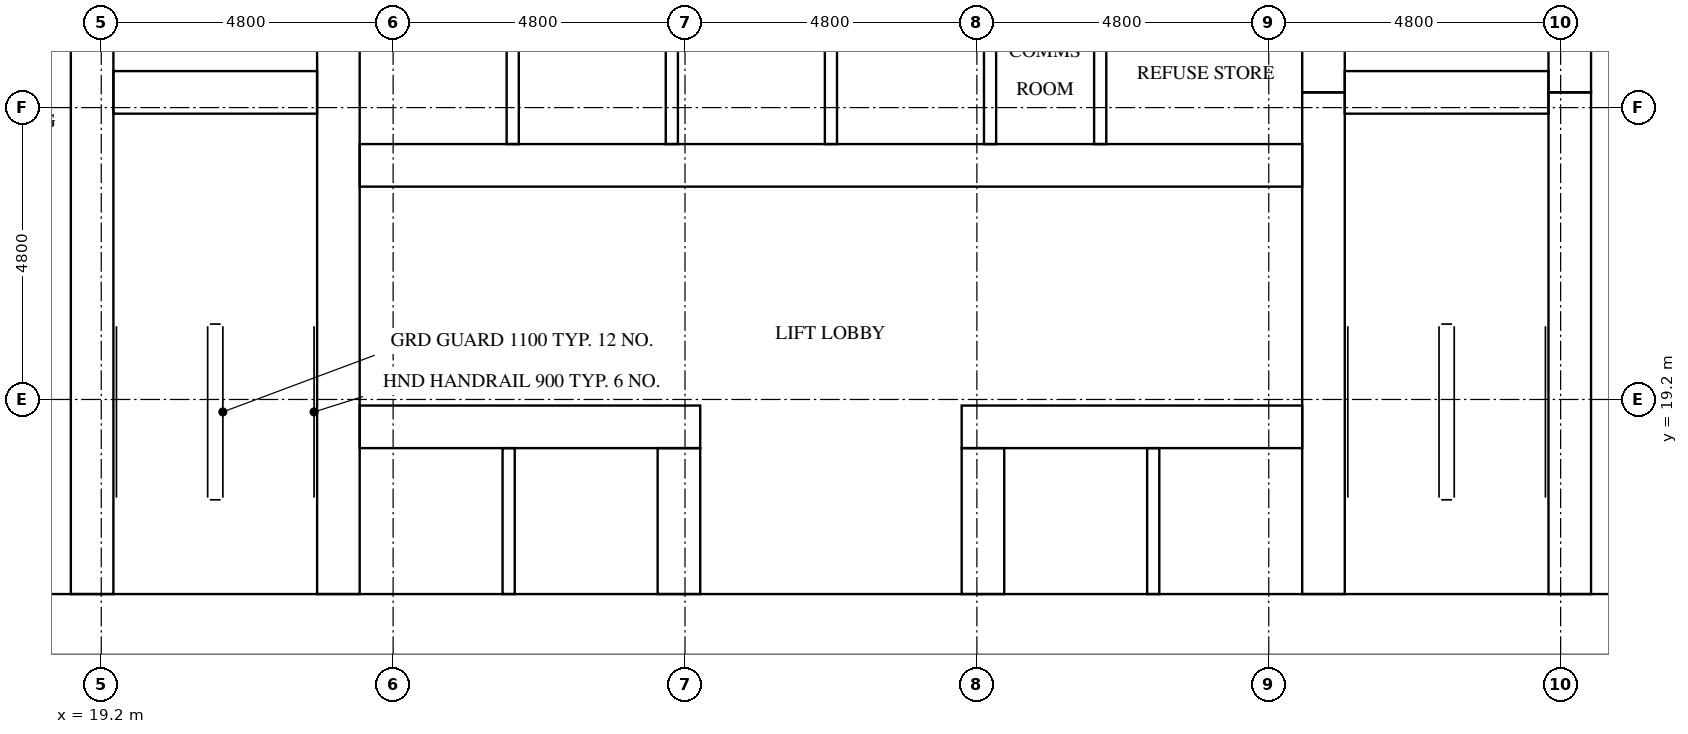
"""IFC4 building model, lengths in metres.
Left out: names, types, materials, properties, quantities, classifications, styles, units other than length and angle.
Written with IfcOpenShell. Run it as: python <this file> out.ifc"""

import sys

from ifc_helpers import new_model, si_unit, direction, frame, frame_2d, origin, place, context, subcontext, project, spatial, rectangle, extrude, element, fill, save


model = new_model("IFC4")
c1 = context("Model", 3, precision=1e-05, world=origin(), true_north=direction((0.0, 1.0)))
c2 = subcontext(c1, "Body", "Model", "MODEL_VIEW")
j1 = project(units=[si_unit("LENGTHUNIT", "METRE"), si_unit("PLANEANGLEUNIT", "RADIAN")], contexts=[c1])
p1 = place(None, origin())
s1 = spatial("IfcSite", under=j1, at=p1, CompositionType="ELEMENT")
p2 = place(p1, origin())
s2 = spatial("IfcBuilding", under=s1, at=p2, CompositionType="ELEMENT")
p3 = place(p2, frame((0.0, 0.0, 43.4)))
s3 = spatial("IfcBuildingStorey", under=s2, at=p3, CompositionType="ELEMENT", Elevation=43.4)
p4 = place(p3, frame((15.0, 15.5, 0.0), z_axis=(0.0, 0.0, 1.0), x_axis=(1.0, 0.0, 0.0)))
e1 = element("IfcWall", 1, at=p4, inside=s3, PredefinedType="SHEAR", context=c2, shape_type="SweptSolid", body=[
    extrude(rectangle(XDim=32.4, YDim=1.0, at=frame_2d((16.2, 0.0))), origin(), (0.0, 0.0, 1.0), 3.2),
])
p5 = place(p4, frame((15.3, 0.0, 0.0)))
e2 = element("IfcOpeningElement", 2, at=p5, cuts=e1, PredefinedType="OPENING", context=c2, shape_type="SweptSolid", body=[
    extrude(rectangle(XDim=1.8, YDim=2.1, at=frame_2d((0.9, 1.05))), frame((0.0, 0.51, 0.0), z_axis=(0.0, -1.0, 0.0), x_axis=(1.0, 0.0, 0.0)), (0.0, 0.0, 1.0), 1.02),
])
p6 = place(p3, frame((19.05, 16.0, 0.0), z_axis=(0.0, 0.0, 1.0), x_axis=(0.0, 1.0, 0.0)))
e3 = element("IfcWall", 3, at=p6, inside=s3, PredefinedType="SHEAR", context=c2, shape_type="SweptSolid", body=[
    extrude(rectangle(XDim=14.9, YDim=0.7, at=frame_2d((7.45, 0.0))), origin(), (0.0, 0.0, 1.0), 3.2),
])
p7 = place(p6, frame((9.45, 0.0, 0.0)))
e4 = element("IfcOpeningElement", 4, at=p7, cuts=e3, PredefinedType="OPENING", context=c2, shape_type="SweptSolid", body=[
    extrude(rectangle(XDim=1.1, YDim=2.1, at=frame_2d((0.55, 1.05))), frame((0.0, 0.36, 0.0), z_axis=(0.0, -1.0, 0.0), x_axis=(1.0, 0.0, 0.0)), (0.0, 0.0, 1.0), 0.72),
])
p8 = place(p6, frame((12.95, 0.0, 0.0)))
e5 = element("IfcOpeningElement", 5, at=p8, cuts=e3, PredefinedType="OPENING", context=c2, shape_type="SweptSolid", body=[
    extrude(rectangle(XDim=1.1, YDim=2.1, at=frame_2d((0.55, 1.05))), frame((0.0, 0.36, 0.0), z_axis=(0.0, -1.0, 0.0), x_axis=(1.0, 0.0, 0.0)), (0.0, 0.0, 1.0), 0.72),
])
p9 = place(p6, frame((0.2, 0.0, 0.0)))
e6 = element("IfcOpeningElement", 6, at=p9, cuts=e3, PredefinedType="OPENING", context=c2, shape_type="SweptSolid", body=[
    extrude(rectangle(XDim=1.2, YDim=2.1, at=frame_2d((0.6, 1.05))), frame((0.0, 0.36, 0.0), z_axis=(0.0, -1.0, 0.0), x_axis=(1.0, 0.0, 0.0)), (0.0, 0.0, 1.0), 0.72),
])
p10 = place(p3, frame((23.1, 16.0, 0.0), z_axis=(0.0, 0.0, 1.0), x_axis=(0.0, 1.0, 0.0)))
e7 = element("IfcWall", 7, at=p10, inside=s3, PredefinedType="SHEAR", context=c2, shape_type="SweptSolid", body=[
    extrude(rectangle(XDim=20.8, YDim=0.7, at=frame_2d((10.4, 0.0))), origin(), (0.0, 0.0, 1.0), 3.2),
])
p11 = place(p3, frame((39.3, 16.0, 0.0), z_axis=(0.0, 0.0, 1.0), x_axis=(0.0, 1.0, 0.0)))
e8 = element("IfcWall", 8, at=p11, inside=s3, PredefinedType="SHEAR", context=c2, shape_type="SweptSolid", body=[
    extrude(rectangle(XDim=8.25, YDim=0.7, at=frame_2d((4.125, 0.0))), origin(), (0.0, 0.0, 1.0), 3.2),
])
p12 = place(p3, frame((39.3, 24.25, 0.0), z_axis=(0.0, 0.0, 1.0), x_axis=(0.0, 1.0, 0.0)))
e9 = element("IfcWall", 9, at=p12, inside=s3, PredefinedType="SHEAR", context=c2, shape_type="SweptSolid", body=[
    extrude(rectangle(XDim=3.5, YDim=0.7, at=frame_2d((1.75, 0.0))), origin(), (0.0, 0.0, 1.0), 3.2),
])
p13 = place(p3, frame((43.35, 16.0, 0.0), z_axis=(0.0, 0.0, 1.0), x_axis=(0.0, 1.0, 0.0)))
e10 = element("IfcWall", 10, at=p13, inside=s3, PredefinedType="SHEAR", context=c2, shape_type="SweptSolid", body=[
    extrude(rectangle(XDim=8.25, YDim=0.7, at=frame_2d((4.125, 0.0))), origin(), (0.0, 0.0, 1.0), 3.2),
])
p14 = place(p13, frame((0.2, 0.0, 0.0)))
e11 = element("IfcOpeningElement", 11, at=p14, cuts=e10, PredefinedType="OPENING", context=c2, shape_type="SweptSolid", body=[
    extrude(rectangle(XDim=1.2, YDim=2.1, at=frame_2d((0.6, 1.05))), frame((0.0, 0.36, 0.0), z_axis=(0.0, -1.0, 0.0), x_axis=(1.0, 0.0, 0.0)), (0.0, 0.0, 1.0), 0.72),
])
p15 = place(p3, frame((43.35, 24.25, 0.0), z_axis=(0.0, 0.0, 1.0), x_axis=(0.0, 1.0, 0.0)))
e12 = element("IfcWall", 12, at=p15, inside=s3, PredefinedType="SHEAR", context=c2, shape_type="SweptSolid", body=[
    extrude(rectangle(XDim=3.5, YDim=0.7, at=frame_2d((1.75, 0.0))), origin(), (0.0, 0.0, 1.0), 3.2),
])
p16 = place(p15, frame((1.2, 0.0, 0.0)))
e13 = element("IfcOpeningElement", 13, at=p16, cuts=e12, PredefinedType="OPENING", context=c2, shape_type="SweptSolid", body=[
    extrude(rectangle(XDim=1.1, YDim=2.1, at=frame_2d((0.55, 1.05))), frame((0.0, 0.36, 0.0), z_axis=(0.0, -1.0, 0.0), x_axis=(1.0, 0.0, 0.0)), (0.0, 0.0, 1.0), 0.72),
])
for number, where, z_axis, x_axis in (
    (14, (19.4, 24.25, 0.0), (0.0, 0.0, 1.0), (1.0, 0.0, 0.0)),
    (15, (39.65, 24.25, 0.0), (0.0, 0.0, 1.0), (1.0, 0.0, 0.0)),
):
    element("IfcWall", number, at=place(p3, frame(where, z_axis=z_axis, x_axis=x_axis)), inside=s3, PredefinedType="SHEAR", context=c2, shape_type="SweptSolid", body=[
        extrude(rectangle(XDim=3.35, YDim=0.7, at=frame_2d((1.675, 0.0))), origin(), (0.0, 0.0, 1.0), 3.2),
    ])
p17 = place(p3, frame((23.45, 18.75, 0.0), z_axis=(0.0, 0.0, 1.0), x_axis=(1.0, 0.0, 0.0)))
e16 = element("IfcWall", 16, at=p17, inside=s3, PredefinedType="SHEAR", context=c2, shape_type="SweptSolid", body=[
    extrude(rectangle(XDim=5.6, YDim=0.7, at=frame_2d((2.8, 0.0))), origin(), (0.0, 0.0, 1.0), 3.2),
])
p18 = place(p17, frame((0.625, 0.0, 0.0)))
e17 = element("IfcOpeningElement", 17, at=p18, cuts=e16, PredefinedType="OPENING", context=c2, shape_type="SweptSolid", body=[
    extrude(rectangle(XDim=1.1, YDim=2.1, at=frame_2d((0.55, 1.05))), frame((0.0, 0.36, 0.0), z_axis=(0.0, -1.0, 0.0), x_axis=(1.0, 0.0, 0.0)), (0.0, 0.0, 1.0), 0.72),
])
p19 = place(p17, frame((3.175, 0.0, 0.0)))
e18 = element("IfcOpeningElement", 18, at=p19, cuts=e16, PredefinedType="OPENING", context=c2, shape_type="SweptSolid", body=[
    extrude(rectangle(XDim=1.1, YDim=2.1, at=frame_2d((0.55, 1.05))), frame((0.0, 0.36, 0.0), z_axis=(0.0, -1.0, 0.0), x_axis=(1.0, 0.0, 0.0)), (0.0, 0.0, 1.0), 0.72),
])
p20 = place(p3, frame((33.35, 18.75, 0.0), z_axis=(0.0, 0.0, 1.0), x_axis=(1.0, 0.0, 0.0)))
e19 = element("IfcWall", 19, at=p20, inside=s3, PredefinedType="SHEAR", context=c2, shape_type="SweptSolid", body=[
    extrude(rectangle(XDim=5.6, YDim=0.7, at=frame_2d((2.8, 0.0))), origin(), (0.0, 0.0, 1.0), 3.2),
])
p21 = place(p20, frame((1.325, 0.0, 0.0)))
e20 = element("IfcOpeningElement", 20, at=p21, cuts=e19, PredefinedType="OPENING", context=c2, shape_type="SweptSolid", body=[
    extrude(rectangle(XDim=1.1, YDim=2.1, at=frame_2d((0.55, 1.05))), frame((0.0, 0.36, 0.0), z_axis=(0.0, -1.0, 0.0), x_axis=(1.0, 0.0, 0.0)), (0.0, 0.0, 1.0), 0.72),
])
p22 = place(p20, frame((3.875, 0.0, 0.0)))
e21 = element("IfcOpeningElement", 21, at=p22, cuts=e19, PredefinedType="OPENING", context=c2, shape_type="SweptSolid", body=[
    extrude(rectangle(XDim=1.1, YDim=2.1, at=frame_2d((0.55, 1.05))), frame((0.0, 0.36, 0.0), z_axis=(0.0, -1.0, 0.0), x_axis=(1.0, 0.0, 0.0)), (0.0, 0.0, 1.0), 0.72),
])
p23 = place(p3, frame((23.45, 23.05, 0.0), z_axis=(0.0, 0.0, 1.0), x_axis=(1.0, 0.0, 0.0)))
e22 = element("IfcWall", 22, at=p23, inside=s3, PredefinedType="SHEAR", context=c2, shape_type="SweptSolid", body=[
    extrude(rectangle(XDim=15.5, YDim=0.7, at=frame_2d((7.75, 0.0))), origin(), (0.0, 0.0, 1.0), 3.2),
])
p24 = place(p23, frame((0.658, 0.0, 0.0)))
e23 = element("IfcOpeningElement", 23, at=p24, cuts=e22, PredefinedType="OPENING", context=c2, shape_type="SweptSolid", body=[
    extrude(rectangle(XDim=1.1, YDim=2.1, at=frame_2d((0.55, 1.05))), frame((0.0, 0.36, 0.0), z_axis=(0.0, -1.0, 0.0), x_axis=(1.0, 0.0, 0.0)), (0.0, 0.0, 1.0), 0.72),
])
p25 = place(p23, frame((3.275, 0.0, 0.0)))
e24 = element("IfcOpeningElement", 24, at=p25, cuts=e22, PredefinedType="OPENING", context=c2, shape_type="SweptSolid", body=[
    extrude(rectangle(XDim=1.1, YDim=2.1, at=frame_2d((0.55, 1.05))), frame((0.0, 0.36, 0.0), z_axis=(0.0, -1.0, 0.0), x_axis=(1.0, 0.0, 0.0)), (0.0, 0.0, 1.0), 0.72),
])
p26 = place(p23, frame((10.772, 0.0, 0.0)))
e25 = element("IfcOpeningElement", 25, at=p26, cuts=e22, PredefinedType="OPENING", context=c2, shape_type="SweptSolid", body=[
    extrude(rectangle(XDim=1.0, YDim=2.1, at=frame_2d((0.5, 1.05))), frame((0.0, 0.36, 0.0), z_axis=(0.0, -1.0, 0.0), x_axis=(1.0, 0.0, 0.0)), (0.0, 0.0, 1.0), 0.72),
])
p27 = place(p23, frame((13.389, 0.0, 0.0)))
e26 = element("IfcOpeningElement", 26, at=p27, cuts=e22, PredefinedType="OPENING", context=c2, shape_type="SweptSolid", body=[
    extrude(rectangle(XDim=1.0, YDim=2.1, at=frame_2d((0.5, 1.05))), frame((0.0, 0.36, 0.0), z_axis=(0.0, -1.0, 0.0), x_axis=(1.0, 0.0, 0.0)), (0.0, 0.0, 1.0), 0.72),
])
for number, where, z_axis, x_axis in (
    (27, (28.7, 16.0, 0.0), (0.0, 0.0, 1.0), (0.0, 1.0, 0.0)),
    (28, (33.7, 16.0, 0.0), (0.0, 0.0, 1.0), (0.0, 1.0, 0.0)),
):
    element("IfcWall", number, at=place(p3, frame(where, z_axis=z_axis, x_axis=x_axis)), inside=s3, PredefinedType="SHEAR", context=c2, shape_type="SweptSolid", body=[
        extrude(rectangle(XDim=2.4, YDim=0.7, at=frame_2d((1.2, 0.0))), origin(), (0.0, 0.0, 1.0), 3.2),
    ])
for number, where, z_axis, x_axis in (
    (29, (25.967, 23.4, 0.0), (0.0, 0.0, 1.0), (0.0, 1.0, 0.0)),
    (30, (28.583, 23.4, 0.0), (0.0, 0.0, 1.0), (0.0, 1.0, 0.0)),
    (31, (31.2, 23.4, 0.0), (0.0, 0.0, 1.0), (0.0, 1.0, 0.0)),
    (32, (33.817, 23.4, 0.0), (0.0, 0.0, 1.0), (0.0, 1.0, 0.0)),
):
    element("IfcWall", number, at=place(p3, frame(where, z_axis=z_axis, x_axis=x_axis)), inside=s3, PredefinedType="SOLIDWALL", context=c2, shape_type="SweptSolid", body=[
        extrude(rectangle(XDim=2.4, YDim=0.2, at=frame_2d((1.2, 0.0))), origin(), (0.0, 0.0, 1.0), 3.2),
    ])
for number, where, z_axis, x_axis in (
    (33, (25.9, 16.0, 0.0), (0.0, 0.0, 1.0), (0.0, 1.0, 0.0)),
    (34, (36.5, 16.0, 0.0), (0.0, 0.0, 1.0), (0.0, 1.0, 0.0)),
):
    element("IfcWall", number, at=place(p3, frame(where, z_axis=z_axis, x_axis=x_axis)), inside=s3, PredefinedType="SOLIDWALL", context=c2, shape_type="SweptSolid", body=[
        extrude(rectangle(XDim=2.4, YDim=0.2, at=frame_2d((1.2, 0.0))), origin(), (0.0, 0.0, 1.0), 3.2),
    ])
p28 = place(p3, frame((35.628, 23.4, 0.0), z_axis=(0.0, 0.0, 1.0), x_axis=(0.0, 1.0, 0.0)))
e35 = element("IfcWall", 35, at=p28, inside=s3, PredefinedType="PARTITIONING", context=c2, shape_type="SweptSolid", body=[
    extrude(rectangle(XDim=2.4, YDim=0.2, at=frame_2d((1.2, 0.0))), origin(), (0.0, 0.0, 1.0), 3.2),
])
p29 = place(p18, origin())
e36 = element("IfcDoor", 36, at=p29, inside=s3, OperationType="DOUBLE_DOOR_SLIDING", PredefinedType="DOOR", context=c2, shape_type="SweptSolid", body=[
    extrude(rectangle(XDim=1.1, YDim=2.1, at=frame_2d((0.55, 1.05))), frame((0.0, 0.025, 0.0), z_axis=(0.0, -1.0, 0.0), x_axis=(1.0, 0.0, 0.0)), (0.0, 0.0, 1.0), 0.05),
])
fill(e17, e36)
p30 = place(p19, origin())
e37 = element("IfcDoor", 37, at=p30, inside=s3, OperationType="DOUBLE_DOOR_SLIDING", PredefinedType="DOOR", context=c2, shape_type="SweptSolid", body=[
    extrude(rectangle(XDim=1.1, YDim=2.1, at=frame_2d((0.55, 1.05))), frame((0.0, 0.025, 0.0), z_axis=(0.0, -1.0, 0.0), x_axis=(1.0, 0.0, 0.0)), (0.0, 0.0, 1.0), 0.05),
])
fill(e18, e37)
p31 = place(p21, origin())
e38 = element("IfcDoor", 38, at=p31, inside=s3, OperationType="DOUBLE_DOOR_SLIDING", PredefinedType="DOOR", context=c2, shape_type="SweptSolid", body=[
    extrude(rectangle(XDim=1.1, YDim=2.1, at=frame_2d((0.55, 1.05))), frame((0.0, 0.025, 0.0), z_axis=(0.0, -1.0, 0.0), x_axis=(1.0, 0.0, 0.0)), (0.0, 0.0, 1.0), 0.05),
])
fill(e20, e38)
p32 = place(p22, origin())
e39 = element("IfcDoor", 39, at=p32, inside=s3, OperationType="DOUBLE_DOOR_SLIDING", PredefinedType="DOOR", context=c2, shape_type="SweptSolid", body=[
    extrude(rectangle(XDim=1.1, YDim=2.1, at=frame_2d((0.55, 1.05))), frame((0.0, 0.025, 0.0), z_axis=(0.0, -1.0, 0.0), x_axis=(1.0, 0.0, 0.0)), (0.0, 0.0, 1.0), 0.05),
])
fill(e21, e39)
p33 = place(p24, origin())
e40 = element("IfcDoor", 40, at=p33, inside=s3, OperationType="DOUBLE_DOOR_SLIDING", PredefinedType="DOOR", context=c2, shape_type="SweptSolid", body=[
    extrude(rectangle(XDim=1.1, YDim=2.1, at=frame_2d((0.55, 1.05))), frame((0.0, 0.025, 0.0), z_axis=(0.0, -1.0, 0.0), x_axis=(1.0, 0.0, 0.0)), (0.0, 0.0, 1.0), 0.05),
])
fill(e23, e40)
p34 = place(p25, origin())
e41 = element("IfcDoor", 41, at=p34, inside=s3, OperationType="DOUBLE_DOOR_SLIDING", PredefinedType="DOOR", context=c2, shape_type="SweptSolid", body=[
    extrude(rectangle(XDim=1.1, YDim=2.1, at=frame_2d((0.55, 1.05))), frame((0.0, 0.025, 0.0), z_axis=(0.0, -1.0, 0.0), x_axis=(1.0, 0.0, 0.0)), (0.0, 0.0, 1.0), 0.05),
])
fill(e24, e41)
p35 = place(p9, frame((1.2, 0.0, 0.0), z_axis=(0.0, 0.0, 1.0), x_axis=(-1.0, 0.0, 0.0)))
e42 = element("IfcDoor", 42, at=p35, inside=s3, OperationType="SINGLE_SWING_RIGHT", PredefinedType="DOOR", context=c2, shape_type="SweptSolid", body=[
    extrude(rectangle(XDim=1.2, YDim=2.1, at=frame_2d((0.6, 1.05))), frame((0.0, 0.025, 0.0), z_axis=(0.0, -1.0, 0.0), x_axis=(1.0, 0.0, 0.0)), (0.0, 0.0, 1.0), 0.05),
])
fill(e6, e42)
p36 = place(p14, origin())
e43 = element("IfcDoor", 43, at=p36, inside=s3, OperationType="SINGLE_SWING_LEFT", PredefinedType="DOOR", context=c2, shape_type="SweptSolid", body=[
    extrude(rectangle(XDim=1.2, YDim=2.1, at=frame_2d((0.6, 1.05))), frame((0.0, 0.025, 0.0), z_axis=(0.0, -1.0, 0.0), x_axis=(1.0, 0.0, 0.0)), (0.0, 0.0, 1.0), 0.05),
])
fill(e11, e43)
p37 = place(p5, frame((1.8, 0.0, 0.0), z_axis=(0.0, 0.0, 1.0), x_axis=(-1.0, 0.0, 0.0)))
e44 = element("IfcDoor", 44, at=p37, inside=s3, OperationType="DOUBLE_DOOR_SINGLE_SWING", PredefinedType="DOOR", context=c2, shape_type="SweptSolid", body=[
    extrude(rectangle(XDim=1.8, YDim=2.1, at=frame_2d((0.9, 1.05))), frame((0.0, 0.025, 0.0), z_axis=(0.0, -1.0, 0.0), x_axis=(1.0, 0.0, 0.0)), (0.0, 0.0, 1.0), 0.05),
])
fill(e2, e44)
p38 = place(p26, frame((1.0, 0.0, 0.0), z_axis=(0.0, 0.0, 1.0), x_axis=(-1.0, 0.0, 0.0)))
e45 = element("IfcDoor", 45, at=p38, inside=s3, OperationType="SINGLE_SWING_LEFT", PredefinedType="DOOR", context=c2, shape_type="SweptSolid", body=[
    extrude(rectangle(XDim=1.0, YDim=2.1, at=frame_2d((0.5, 1.05))), frame((0.0, 0.025, 0.0), z_axis=(0.0, -1.0, 0.0), x_axis=(1.0, 0.0, 0.0)), (0.0, 0.0, 1.0), 0.05),
])
fill(e25, e45)
p39 = place(p27, frame((1.0, 0.0, 0.0), z_axis=(0.0, 0.0, 1.0), x_axis=(-1.0, 0.0, 0.0)))
e46 = element("IfcDoor", 46, at=p39, inside=s3, OperationType="SINGLE_SWING_RIGHT", PredefinedType="DOOR", context=c2, shape_type="SweptSolid", body=[
    extrude(rectangle(XDim=1.0, YDim=2.1, at=frame_2d((0.5, 1.05))), frame((0.0, 0.025, 0.0), z_axis=(0.0, -1.0, 0.0), x_axis=(1.0, 0.0, 0.0)), (0.0, 0.0, 1.0), 0.05),
])
fill(e26, e46)
save(model, sys.argv[1])
